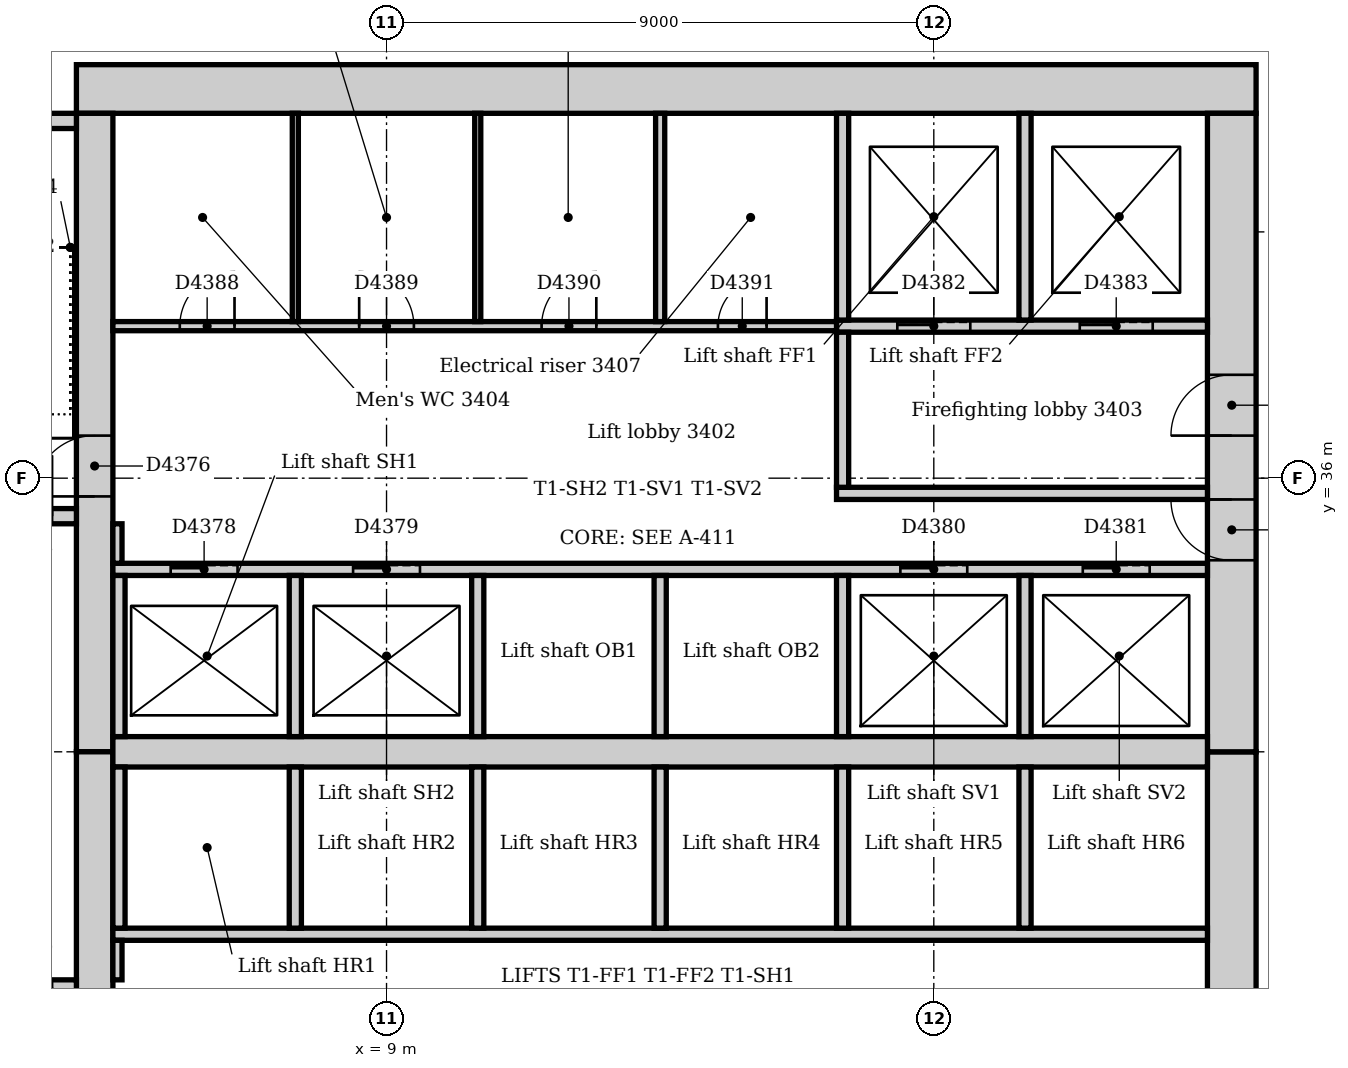
"""IFC4 building model, lengths in metres.
Left out: names, types, materials, properties, quantities, classifications, styles, units other than length and angle.
Written with IfcOpenShell. Run it as: python <this file> out.ifc"""

import sys

from ifc_helpers import new_model, si_unit, direction, frame, frame_2d, origin, place, context, subcontext, project, spatial, rectangle, extrude, element, fill, save


model = new_model("IFC4")
c1 = context("Model", 3, precision=1e-05, world=origin(), true_north=direction((0.0, 1.0)))
c2 = subcontext(c1, "Body", "Model", "MODEL_VIEW")
j1 = project(units=[si_unit("LENGTHUNIT", "METRE"), si_unit("PLANEANGLEUNIT", "RADIAN")], contexts=[c1])
p1 = place(None, origin())
s1 = spatial("IfcSite", under=j1, at=p1, CompositionType="ELEMENT")
p2 = place(p1, origin())
s2 = spatial("IfcBuilding", under=s1, at=p2, CompositionType="ELEMENT")
p3 = place(p2, frame((0.0, 0.0, 144.0)))
s3 = spatial("IfcBuildingStorey", under=s2, at=p3, CompositionType="ELEMENT", Elevation=144.0)
p4 = place(p3, frame((23.3, 42.4, 0.0), z_axis=(0.0, 0.0, 1.0), x_axis=(-1.0, 0.0, 0.0)))
e1 = element("IfcWall", 1, at=p4, inside=s3, PredefinedType="SOLIDWALL", context=c2, shape_type="SweptSolid", body=[
    extrude(rectangle(XDim=19.4, YDim=0.8, at=frame_2d((9.7, 0.0))), origin(), (0.0, 0.0, 1.0), 5.0),
])
p5 = place(p3, frame((22.9, 21.0, 0.0), z_axis=(0.0, 0.0, 1.0), x_axis=(0.0, 1.0, 0.0)))
e2 = element("IfcWall", 2, at=p5, inside=s3, PredefinedType="SOLIDWALL", context=c2, shape_type="SweptSolid", body=[
    extrude(rectangle(XDim=10.5, YDim=0.8, at=frame_2d((5.25, 0.0))), origin(), (0.0, 0.0, 1.0), 5.0),
])
p6 = place(p5, frame((4.35, 0.0, 0.0)))
e3 = element("IfcOpeningElement", 3, at=p6, cuts=e2, PredefinedType="OPENING", context=c2, shape_type="SweptSolid", body=[
    extrude(rectangle(XDim=1.8, YDim=2.1, at=frame_2d((0.9, 1.05))), frame((0.0, 0.41, 0.0), z_axis=(0.0, -1.0, 0.0), x_axis=(1.0, 0.0, 0.0)), (0.0, 0.0, 1.0), 0.82),
])
p7 = place(p3, frame((22.9, 31.5, 0.0), z_axis=(0.0, 0.0, 1.0), x_axis=(0.0, 1.0, 0.0)))
e4 = element("IfcWall", 4, at=p7, inside=s3, PredefinedType="SOLIDWALL", context=c2, shape_type="SweptSolid", body=[
    extrude(rectangle(XDim=10.5, YDim=0.8, at=frame_2d((5.25, 0.0))), origin(), (0.0, 0.0, 1.0), 5.0),
])
p8 = place(p7, frame((3.15, 0.0, 0.0)))
e5 = element("IfcOpeningElement", 5, at=p8, cuts=e4, PredefinedType="OPENING", context=c2, shape_type="SweptSolid", body=[
    extrude(rectangle(XDim=1.0, YDim=2.1, at=frame_2d((0.5, 1.05))), frame((0.0, 0.41, 0.0), z_axis=(0.0, -1.0, 0.0), x_axis=(1.0, 0.0, 0.0)), (0.0, 0.0, 1.0), 0.82),
])
p9 = place(p7, frame((5.2, 0.0, 0.0)))
e6 = element("IfcOpeningElement", 6, at=p9, cuts=e4, PredefinedType="OPENING", context=c2, shape_type="SweptSolid", body=[
    extrude(rectangle(XDim=1.0, YDim=2.1, at=frame_2d((0.5, 1.05))), frame((0.0, 0.41, 0.0), z_axis=(0.0, -1.0, 0.0), x_axis=(1.0, 0.0, 0.0)), (0.0, 0.0, 1.0), 0.82),
])
p10 = place(p3, frame((4.2, 42.0, 0.0), z_axis=(0.0, 0.0, 1.0), x_axis=(0.0, -1.0, 0.0)))
e7 = element("IfcWall", 7, at=p10, inside=s3, PredefinedType="SOLIDWALL", context=c2, shape_type="SweptSolid", body=[
    extrude(rectangle(XDim=10.5, YDim=0.6, at=frame_2d((5.25, 0.0))), origin(), (0.0, 0.0, 1.0), 5.0),
])
p11 = place(p10, frame((5.3, 0.0, 0.0)))
e8 = element("IfcOpeningElement", 8, at=p11, cuts=e7, PredefinedType="OPENING", context=c2, shape_type="SweptSolid", body=[
    extrude(rectangle(XDim=1.0, YDim=2.1, at=frame_2d((0.5, 1.05))), frame((0.0, 0.31, 0.0), z_axis=(0.0, -1.0, 0.0), x_axis=(1.0, 0.0, 0.0)), (0.0, 0.0, 1.0), 0.62),
])
p12 = place(p3, frame((4.2, 31.5, 0.0), z_axis=(0.0, 0.0, 1.0), x_axis=(0.0, -1.0, 0.0)))
e9 = element("IfcWall", 9, at=p12, inside=s3, PredefinedType="SOLIDWALL", context=c2, shape_type="SweptSolid", body=[
    extrude(rectangle(XDim=10.5, YDim=0.6, at=frame_2d((5.25, 0.0))), origin(), (0.0, 0.0, 1.0), 5.0),
])
p13 = place(p12, frame((4.25, 0.0, 0.0)))
e10 = element("IfcOpeningElement", 10, at=p13, cuts=e9, PredefinedType="OPENING", context=c2, shape_type="SweptSolid", body=[
    extrude(rectangle(XDim=1.0, YDim=2.1, at=frame_2d((0.5, 1.05))), frame((0.0, 0.31, 0.0), z_axis=(0.0, -1.0, 0.0), x_axis=(1.0, 0.0, 0.0)), (0.0, 0.0, 1.0), 0.62),
])
p14 = place(p3, frame((4.5, 31.5, 0.0), z_axis=(0.0, 0.0, 1.0), x_axis=(1.0, 0.0, 0.0)))
e11 = element("IfcWall", 11, at=p14, inside=s3, PredefinedType="SOLIDWALL", context=c2, shape_type="SweptSolid", body=[
    extrude(rectangle(XDim=18.0, YDim=0.5, at=frame_2d((9.0, 0.0))), origin(), (0.0, 0.0, 1.0), 5.0),
])
p15 = place(p3, frame((3.9, 27.625, 0.0), z_axis=(0.0, 0.0, 1.0), x_axis=(-1.0, 0.0, 0.0)))
e12 = element("IfcWall", 12, at=p15, inside=s3, PredefinedType="SOLIDWALL", context=c2, shape_type="SweptSolid", body=[
    extrude(rectangle(XDim=3.54, YDim=0.25, at=frame_2d((1.77, 0.0))), origin(), (0.0, 0.0, 1.0), 5.0),
])
p16 = place(p15, frame((0.4, 0.0, 0.0)))
e13 = element("IfcOpeningElement", 13, at=p16, cuts=e12, PredefinedType="OPENING", context=c2, shape_type="SweptSolid", body=[
    extrude(rectangle(XDim=1.0, YDim=2.1, at=frame_2d((0.5, 1.05))), frame((0.0, 0.135, 0.0), z_axis=(0.0, -1.0, 0.0), x_axis=(1.0, 0.0, 0.0)), (0.0, 0.0, 1.0), 0.27),
])
p17 = place(p3, frame((0.36, 35.375, 0.0), z_axis=(0.0, 0.0, 1.0), x_axis=(1.0, 0.0, 0.0)))
e14 = element("IfcWall", 14, at=p17, inside=s3, PredefinedType="SOLIDWALL", context=c2, shape_type="SweptSolid", body=[
    extrude(rectangle(XDim=3.54, YDim=0.25, at=frame_2d((1.77, 0.0))), origin(), (0.0, 0.0, 1.0), 5.0),
])
p18 = place(p17, frame((2.14, 0.0, 0.0)))
e15 = element("IfcOpeningElement", 15, at=p18, cuts=e14, PredefinedType="OPENING", context=c2, shape_type="SweptSolid", body=[
    extrude(rectangle(XDim=1.0, YDim=2.1, at=frame_2d((0.5, 1.05))), frame((0.0, 0.135, 0.0), z_axis=(0.0, -1.0, 0.0), x_axis=(1.0, 0.0, 0.0)), (0.0, 0.0, 1.0), 0.27),
])
p19 = place(p3, frame((3.9, 41.875, 0.0), z_axis=(0.0, 0.0, 1.0), x_axis=(-1.0, 0.0, 0.0)))
e16 = element("IfcWall", 16, at=p19, inside=s3, PredefinedType="SOLIDWALL", context=c2, shape_type="SweptSolid", body=[
    extrude(rectangle(XDim=3.54, YDim=0.25, at=frame_2d((1.77, 0.0))), origin(), (0.0, 0.0, 1.0), 5.0),
])
p20 = place(p3, frame((16.4, 35.75, 0.0), z_axis=(0.0, 0.0, 1.0), x_axis=(1.0, 0.0, 0.0)))
e17 = element("IfcWall", 17, at=p20, inside=s3, PredefinedType="PARTITIONING", context=c2, shape_type="SweptSolid", body=[
    extrude(rectangle(XDim=6.1, YDim=0.2, at=frame_2d((3.05, 0.0))), origin(), (0.0, 0.0, 1.0), 4.85),
])
p21 = place(p3, frame((16.4, 38.5, 0.0), z_axis=(0.0, 0.0, 1.0), x_axis=(1.0, 0.0, 0.0)))
e18 = element("IfcWall", 18, at=p21, inside=s3, PredefinedType="PARTITIONING", context=c2, shape_type="SweptSolid", body=[
    extrude(rectangle(XDim=6.1, YDim=0.2, at=frame_2d((3.05, 0.0))), origin(), (0.0, 0.0, 1.0), 4.85),
])
p22 = place(p21, frame((1.0, 0.0, 0.0)))
e19 = element("IfcOpeningElement", 19, at=p22, cuts=e18, PredefinedType="OPENING", context=c2, shape_type="SweptSolid", body=[
    extrude(rectangle(XDim=1.2, YDim=2.1, at=frame_2d((0.6, 1.05))), frame((0.0, 0.11, 0.0), z_axis=(0.0, -1.0, 0.0), x_axis=(1.0, 0.0, 0.0)), (0.0, 0.0, 1.0), 0.22),
])
p23 = place(p21, frame((4.0, 0.0, 0.0)))
e20 = element("IfcOpeningElement", 20, at=p23, cuts=e18, PredefinedType="OPENING", context=c2, shape_type="SweptSolid", body=[
    extrude(rectangle(XDim=1.2, YDim=2.1, at=frame_2d((0.6, 1.05))), frame((0.0, 0.11, 0.0), z_axis=(0.0, -1.0, 0.0), x_axis=(1.0, 0.0, 0.0)), (0.0, 0.0, 1.0), 0.22),
])
p24 = place(p3, frame((16.5, 35.85, 0.0), z_axis=(0.0, 0.0, 1.0), x_axis=(0.0, 1.0, 0.0)))
e21 = element("IfcWall", 21, at=p24, inside=s3, PredefinedType="PARTITIONING", context=c2, shape_type="SweptSolid", body=[
    extrude(rectangle(XDim=2.55, YDim=0.2, at=frame_2d((1.275, 0.0))), origin(), (0.0, 0.0, 1.0), 4.85),
])
p25 = place(p3, frame((4.5, 28.5, 0.0), z_axis=(0.0, 0.0, 1.0), x_axis=(1.0, 0.0, 0.0)))
e22 = element("IfcWall", 22, at=p25, inside=s3, PredefinedType="PARTITIONING", context=c2, shape_type="SweptSolid", body=[
    extrude(rectangle(XDim=18.0, YDim=0.2, at=frame_2d((9.0, 0.0))), origin(), (0.0, 0.0, 1.0), 4.85),
])
p26 = place(p3, frame((4.5, 34.5, 0.0), z_axis=(0.0, 0.0, 1.0), x_axis=(1.0, 0.0, 0.0)))
e23 = element("IfcWall", 23, at=p26, inside=s3, PredefinedType="PARTITIONING", context=c2, shape_type="SweptSolid", body=[
    extrude(rectangle(XDim=18.0, YDim=0.2, at=frame_2d((9.0, 0.0))), origin(), (0.0, 0.0, 1.0), 4.85),
])
p27 = place(p26, frame((0.95, 0.0, 0.0)))
e24 = element("IfcOpeningElement", 24, at=p27, cuts=e23, PredefinedType="OPENING", context=c2, shape_type="SweptSolid", body=[
    extrude(rectangle(XDim=1.1, YDim=2.1, at=frame_2d((0.55, 1.05))), frame((0.0, 0.11, 0.0), z_axis=(0.0, -1.0, 0.0), x_axis=(1.0, 0.0, 0.0)), (0.0, 0.0, 1.0), 0.22),
])
p28 = place(p26, frame((3.95, 0.0, 0.0)))
e25 = element("IfcOpeningElement", 25, at=p28, cuts=e23, PredefinedType="OPENING", context=c2, shape_type="SweptSolid", body=[
    extrude(rectangle(XDim=1.1, YDim=2.1, at=frame_2d((0.55, 1.05))), frame((0.0, 0.11, 0.0), z_axis=(0.0, -1.0, 0.0), x_axis=(1.0, 0.0, 0.0)), (0.0, 0.0, 1.0), 0.22),
])
p29 = place(p26, frame((12.95, 0.0, 0.0)))
e26 = element("IfcOpeningElement", 26, at=p29, cuts=e23, PredefinedType="OPENING", context=c2, shape_type="SweptSolid", body=[
    extrude(rectangle(XDim=1.1, YDim=2.1, at=frame_2d((0.55, 1.05))), frame((0.0, 0.11, 0.0), z_axis=(0.0, -1.0, 0.0), x_axis=(1.0, 0.0, 0.0)), (0.0, 0.0, 1.0), 0.22),
])
p30 = place(p26, frame((15.95, 0.0, 0.0)))
e27 = element("IfcOpeningElement", 27, at=p30, cuts=e23, PredefinedType="OPENING", context=c2, shape_type="SweptSolid", body=[
    extrude(rectangle(XDim=1.1, YDim=2.1, at=frame_2d((0.55, 1.05))), frame((0.0, 0.11, 0.0), z_axis=(0.0, -1.0, 0.0), x_axis=(1.0, 0.0, 0.0)), (0.0, 0.0, 1.0), 0.22),
])
for number, where, z_axis, x_axis in (
    (28, (4.6, 31.75, 0.0), (0.0, 0.0, 1.0), (0.0, 1.0, 0.0)),
    (29, (4.6, 28.6, 0.0), (0.0, 0.0, 1.0), (0.0, 1.0, 0.0)),
    (30, (7.5, 28.6, 0.0), (0.0, 0.0, 1.0), (0.0, 1.0, 0.0)),
    (31, (7.5, 31.75, 0.0), (0.0, 0.0, 1.0), (0.0, 1.0, 0.0)),
    (32, (10.5, 28.6, 0.0), (0.0, 0.0, 1.0), (0.0, 1.0, 0.0)),
    (33, (10.5, 31.75, 0.0), (0.0, 0.0, 1.0), (0.0, 1.0, 0.0)),
    (34, (13.5, 28.6, 0.0), (0.0, 0.0, 1.0), (0.0, 1.0, 0.0)),
    (35, (13.5, 31.75, 0.0), (0.0, 0.0, 1.0), (0.0, 1.0, 0.0)),
    (36, (16.5, 28.6, 0.0), (0.0, 0.0, 1.0), (0.0, 1.0, 0.0)),
    (37, (16.5, 31.75, 0.0), (0.0, 0.0, 1.0), (0.0, 1.0, 0.0)),
    (38, (19.5, 28.6, 0.0), (0.0, 0.0, 1.0), (0.0, 1.0, 0.0)),
    (39, (19.5, 31.75, 0.0), (0.0, 0.0, 1.0), (0.0, 1.0, 0.0)),
):
    element("IfcWall", number, at=place(p3, frame(where, z_axis=z_axis, x_axis=x_axis)), inside=s3, PredefinedType="PARTITIONING", context=c2, shape_type="SweptSolid", body=[
        extrude(rectangle(XDim=2.65, YDim=0.2, at=frame_2d((1.325, 0.0))), origin(), (0.0, 0.0, 1.0), 4.85),
    ])
for number, where, z_axis, x_axis in (
    (40, (16.5, 38.6, 0.0), (0.0, 0.0, 1.0), (0.0, 1.0, 0.0)),
    (41, (19.5, 38.6, 0.0), (0.0, 0.0, 1.0), (0.0, 1.0, 0.0)),
):
    element("IfcWall", number, at=place(p3, frame(where, z_axis=z_axis, x_axis=x_axis)), inside=s3, PredefinedType="PARTITIONING", context=c2, shape_type="SweptSolid", body=[
        extrude(rectangle(XDim=3.4, YDim=0.2, at=frame_2d((1.7, 0.0))), origin(), (0.0, 0.0, 1.0), 4.85),
    ])
p31 = place(p3, frame((4.5, 38.5, 0.0), z_axis=(0.0, 0.0, 1.0), x_axis=(1.0, 0.0, 0.0)))
e42 = element("IfcWall", 42, at=p31, inside=s3, PredefinedType="PARTITIONING", context=c2, shape_type="SweptSolid", body=[
    extrude(rectangle(XDim=11.9, YDim=0.15, at=frame_2d((5.95, 0.0))), origin(), (0.0, 0.0, 1.0), 4.85),
])
p32 = place(p31, frame((1.1, 0.0, 0.0)))
e43 = element("IfcOpeningElement", 43, at=p32, cuts=e42, PredefinedType="OPENING", context=c2, shape_type="SweptSolid", body=[
    extrude(rectangle(XDim=0.9, YDim=2.1, at=frame_2d((0.45, 1.05))), frame((0.0, 0.085, 0.0), z_axis=(0.0, -1.0, 0.0), x_axis=(1.0, 0.0, 0.0)), (0.0, 0.0, 1.0), 0.17),
])
p33 = place(p31, frame((4.05, 0.0, 0.0)))
e44 = element("IfcOpeningElement", 44, at=p33, cuts=e42, PredefinedType="OPENING", context=c2, shape_type="SweptSolid", body=[
    extrude(rectangle(XDim=0.9, YDim=2.1, at=frame_2d((0.45, 1.05))), frame((0.0, 0.085, 0.0), z_axis=(0.0, -1.0, 0.0), x_axis=(1.0, 0.0, 0.0)), (0.0, 0.0, 1.0), 0.17),
])
p34 = place(p31, frame((7.05, 0.0, 0.0)))
e45 = element("IfcOpeningElement", 45, at=p34, cuts=e42, PredefinedType="OPENING", context=c2, shape_type="SweptSolid", body=[
    extrude(rectangle(XDim=0.9, YDim=2.1, at=frame_2d((0.45, 1.05))), frame((0.0, 0.085, 0.0), z_axis=(0.0, -1.0, 0.0), x_axis=(1.0, 0.0, 0.0)), (0.0, 0.0, 1.0), 0.17),
])
p35 = place(p31, frame((9.95, 0.0, 0.0)))
e46 = element("IfcOpeningElement", 46, at=p35, cuts=e42, PredefinedType="OPENING", context=c2, shape_type="SweptSolid", body=[
    extrude(rectangle(XDim=0.8, YDim=2.1, at=frame_2d((0.4, 1.05))), frame((0.0, 0.085, 0.0), z_axis=(0.0, -1.0, 0.0), x_axis=(1.0, 0.0, 0.0)), (0.0, 0.0, 1.0), 0.17),
])
for number, where, z_axis, x_axis in (
    (47, (4.575, 27.75, 0.0), (0.0, 0.0, 1.0), (0.0, 1.0, 0.0)),
    (48, (4.575, 34.6, 0.0), (0.0, 0.0, 1.0), (0.0, 1.0, 0.0)),
):
    element("IfcWall", number, at=place(p3, frame(where, z_axis=z_axis, x_axis=x_axis)), inside=s3, PredefinedType="PARTITIONING", context=c2, shape_type="SweptSolid", body=[
        extrude(rectangle(XDim=0.65, YDim=0.15, at=frame_2d((0.325, 0.0))), origin(), (0.0, 0.0, 1.0), 4.85),
    ])
p36 = place(p3, frame((13.5, 38.575, 0.0), z_axis=(0.0, 0.0, 1.0), x_axis=(0.0, 1.0, 0.0)))
e49 = element("IfcWall", 49, at=p36, inside=s3, PredefinedType="PARTITIONING", context=c2, shape_type="SweptSolid", body=[
    extrude(rectangle(XDim=3.425, YDim=0.15, at=frame_2d((1.712, 0.0))), origin(), (0.0, 0.0, 1.0), 4.85),
])
for number, where, z_axis, x_axis in (
    (50, (7.5, 38.575, 0.0), (0.0, 0.0, 1.0), (0.0, 1.0, 0.0)),
    (51, (10.5, 38.575, 0.0), (0.0, 0.0, 1.0), (0.0, 1.0, 0.0)),
):
    element("IfcWall", number, at=place(p3, frame(where, z_axis=z_axis, x_axis=x_axis)), inside=s3, PredefinedType="PARTITIONING", context=c2, shape_type="SweptSolid", body=[
        extrude(rectangle(XDim=3.425, YDim=0.1, at=frame_2d((1.712, 0.0))), origin(), (0.0, 0.0, 1.0), 4.85),
    ])
p37 = place(p11, frame((1.0, 0.0, 0.0), z_axis=(0.0, 0.0, 1.0), x_axis=(-1.0, 0.0, 0.0)))
e52 = element("IfcDoor", 52, at=p37, inside=s3, OperationType="SINGLE_SWING_LEFT", PredefinedType="DOOR", context=c2, shape_type="SweptSolid", body=[
    extrude(rectangle(XDim=1.0, YDim=2.1, at=frame_2d((0.5, 1.05))), frame((0.0, 0.025, 0.0), z_axis=(0.0, -1.0, 0.0), x_axis=(1.0, 0.0, 0.0)), (0.0, 0.0, 1.0), 0.05),
])
fill(e8, e52)
p38 = place(p27, origin())
e53 = element("IfcDoor", 53, at=p38, inside=s3, OperationType="SLIDING_TO_LEFT", PredefinedType="DOOR", context=c2, shape_type="SweptSolid", body=[
    extrude(rectangle(XDim=1.1, YDim=2.1, at=frame_2d((0.55, 1.05))), frame((0.0, 0.025, 0.0), z_axis=(0.0, -1.0, 0.0), x_axis=(1.0, 0.0, 0.0)), (0.0, 0.0, 1.0), 0.05),
])
fill(e24, e53)
p39 = place(p28, origin())
e54 = element("IfcDoor", 54, at=p39, inside=s3, OperationType="SLIDING_TO_LEFT", PredefinedType="DOOR", context=c2, shape_type="SweptSolid", body=[
    extrude(rectangle(XDim=1.1, YDim=2.1, at=frame_2d((0.55, 1.05))), frame((0.0, 0.025, 0.0), z_axis=(0.0, -1.0, 0.0), x_axis=(1.0, 0.0, 0.0)), (0.0, 0.0, 1.0), 0.05),
])
fill(e25, e54)
p40 = place(p29, origin())
e55 = element("IfcDoor", 55, at=p40, inside=s3, OperationType="SLIDING_TO_LEFT", PredefinedType="DOOR", context=c2, shape_type="SweptSolid", body=[
    extrude(rectangle(XDim=1.1, YDim=2.1, at=frame_2d((0.55, 1.05))), frame((0.0, 0.025, 0.0), z_axis=(0.0, -1.0, 0.0), x_axis=(1.0, 0.0, 0.0)), (0.0, 0.0, 1.0), 0.05),
])
fill(e26, e55)
p41 = place(p30, origin())
e56 = element("IfcDoor", 56, at=p41, inside=s3, OperationType="SLIDING_TO_LEFT", PredefinedType="DOOR", context=c2, shape_type="SweptSolid", body=[
    extrude(rectangle(XDim=1.1, YDim=2.1, at=frame_2d((0.55, 1.05))), frame((0.0, 0.025, 0.0), z_axis=(0.0, -1.0, 0.0), x_axis=(1.0, 0.0, 0.0)), (0.0, 0.0, 1.0), 0.05),
])
fill(e27, e56)
p42 = place(p22, origin())
e57 = element("IfcDoor", 57, at=p42, inside=s3, OperationType="SLIDING_TO_LEFT", PredefinedType="DOOR", context=c2, shape_type="SweptSolid", body=[
    extrude(rectangle(XDim=1.2, YDim=2.1, at=frame_2d((0.6, 1.05))), frame((0.0, 0.025, 0.0), z_axis=(0.0, -1.0, 0.0), x_axis=(1.0, 0.0, 0.0)), (0.0, 0.0, 1.0), 0.05),
])
fill(e19, e57)
p43 = place(p23, origin())
e58 = element("IfcDoor", 58, at=p43, inside=s3, OperationType="SLIDING_TO_LEFT", PredefinedType="DOOR", context=c2, shape_type="SweptSolid", body=[
    extrude(rectangle(XDim=1.2, YDim=2.1, at=frame_2d((0.6, 1.05))), frame((0.0, 0.025, 0.0), z_axis=(0.0, -1.0, 0.0), x_axis=(1.0, 0.0, 0.0)), (0.0, 0.0, 1.0), 0.05),
])
fill(e20, e58)
p44 = place(p8, origin())
e59 = element("IfcDoor", 59, at=p44, inside=s3, OperationType="SINGLE_SWING_RIGHT", PredefinedType="DOOR", context=c2, shape_type="SweptSolid", body=[
    extrude(rectangle(XDim=1.0, YDim=2.1, at=frame_2d((0.5, 1.05))), frame((0.0, 0.025, 0.0), z_axis=(0.0, -1.0, 0.0), x_axis=(1.0, 0.0, 0.0)), (0.0, 0.0, 1.0), 0.05),
])
fill(e5, e59)
p45 = place(p9, origin())
e60 = element("IfcDoor", 60, at=p45, inside=s3, OperationType="SINGLE_SWING_LEFT", PredefinedType="DOOR", context=c2, shape_type="SweptSolid", body=[
    extrude(rectangle(XDim=1.0, YDim=2.1, at=frame_2d((0.5, 1.05))), frame((0.0, 0.025, 0.0), z_axis=(0.0, -1.0, 0.0), x_axis=(1.0, 0.0, 0.0)), (0.0, 0.0, 1.0), 0.05),
])
fill(e6, e60)
p46 = place(p32, origin())
e61 = element("IfcDoor", 61, at=p46, inside=s3, OperationType="SINGLE_SWING_RIGHT", PredefinedType="DOOR", context=c2, shape_type="SweptSolid", body=[
    extrude(rectangle(XDim=0.9, YDim=2.1, at=frame_2d((0.45, 1.05))), frame((0.0, 0.025, 0.0), z_axis=(0.0, -1.0, 0.0), x_axis=(1.0, 0.0, 0.0)), (0.0, 0.0, 1.0), 0.05),
])
fill(e43, e61)
p47 = place(p33, origin())
e62 = element("IfcDoor", 62, at=p47, inside=s3, OperationType="SINGLE_SWING_LEFT", PredefinedType="DOOR", context=c2, shape_type="SweptSolid", body=[
    extrude(rectangle(XDim=0.9, YDim=2.1, at=frame_2d((0.45, 1.05))), frame((0.0, 0.025, 0.0), z_axis=(0.0, -1.0, 0.0), x_axis=(1.0, 0.0, 0.0)), (0.0, 0.0, 1.0), 0.05),
])
fill(e44, e62)
p48 = place(p34, origin())
e63 = element("IfcDoor", 63, at=p48, inside=s3, OperationType="SINGLE_SWING_RIGHT", PredefinedType="DOOR", context=c2, shape_type="SweptSolid", body=[
    extrude(rectangle(XDim=0.9, YDim=2.1, at=frame_2d((0.45, 1.05))), frame((0.0, 0.025, 0.0), z_axis=(0.0, -1.0, 0.0), x_axis=(1.0, 0.0, 0.0)), (0.0, 0.0, 1.0), 0.05),
])
fill(e45, e63)
p49 = place(p35, origin())
e64 = element("IfcDoor", 64, at=p49, inside=s3, OperationType="SINGLE_SWING_RIGHT", PredefinedType="DOOR", context=c2, shape_type="SweptSolid", body=[
    extrude(rectangle(XDim=0.8, YDim=2.1, at=frame_2d((0.4, 1.05))), frame((0.0, 0.025, 0.0), z_axis=(0.0, -1.0, 0.0), x_axis=(1.0, 0.0, 0.0)), (0.0, 0.0, 1.0), 0.05),
])
fill(e46, e64)
save(model, sys.argv[1])
